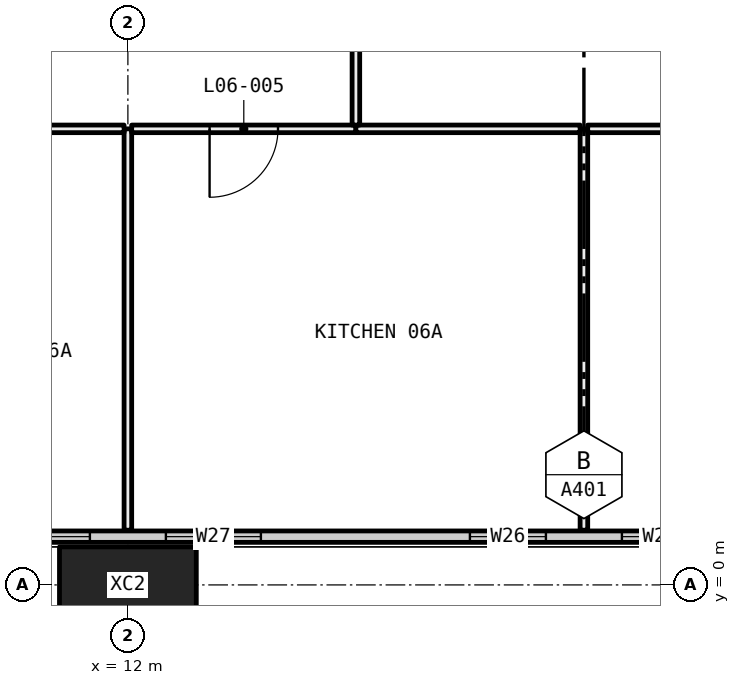
"""IFC4 building model, lengths in metres.
Left out: names, types, materials, properties, quantities, classifications, styles, units other than length and angle.
Written with IfcOpenShell. Run it as: python <this file> out.ifc"""

import sys

from ifc_helpers import new_model, si_unit, direction, frame, frame_2d, origin, origin_2d, place, context, subcontext, project, spatial, rectangle, hollow_rectangle, extrude, element, fill, save


model = new_model("IFC4")
c1 = context("Model", 3, precision=1e-05, world=origin(), true_north=direction((0.0, 1.0)))
c2 = subcontext(c1, "Body", "Model", "MODEL_VIEW")
j1 = project(units=[si_unit("LENGTHUNIT", "METRE"), si_unit("PLANEANGLEUNIT", "RADIAN")], contexts=[c1])
p1 = place(None, origin())
s1 = spatial("IfcSite", under=j1, at=p1, CompositionType="ELEMENT")
p2 = place(p1, origin())
s2 = spatial("IfcBuilding", under=s1, at=p2, CompositionType="ELEMENT")
p3 = place(p2, frame((0.0, 0.0, 33.45)))
s3 = spatial("IfcBuildingStorey", under=s2, at=p3, CompositionType="ELEMENT", Elevation=33.45)
p4 = place(p3, frame((12.0, 0.0, -0.4), z_axis=(0.0, 0.0, 1.0), x_axis=(1.0, 0.0, 0.0)))
e1 = element("IfcColumn", 1, at=p4, inside=s3, PredefinedType="COLUMN", context=c2, shape_type="SweptSolid", body=[
    extrude(hollow_rectangle(XDim=1.8, YDim=1.0, WallThickness=0.07, at=origin_2d()), origin(), (0.0, 0.0, 1.0), 3.45),
])
p5 = place(p3, frame((6.56, 0.635, 0.0), z_axis=(0.0, 0.0, 1.0), x_axis=(1.0, 0.0, 0.0)))
e2 = element("IfcWall", 2, at=p5, inside=s3, PredefinedType="ELEMENTEDWALL", context=c2, shape_type="SweptSolid", body=[
    extrude(rectangle(XDim=58.88, YDim=0.15, at=frame_2d((29.44, 0.0))), origin(), (0.0, 0.0, 1.0), 3.05),
])
p6 = place(p5, frame((0.44, 0.0, 0.45)))
e3 = element("IfcOpeningElement", 3, at=p6, cuts=e2, PredefinedType="OPENING", context=c2, shape_type="SweptSolid", body=[
    extrude(rectangle(XDim=4.5, YDim=2.55, at=frame_2d((2.25, 1.275))), frame((0.0, 0.085, 0.0), z_axis=(0.0, -1.0, 0.0), x_axis=(1.0, 0.0, 0.0)), (0.0, 0.0, 1.0), 0.17),
])
p7 = place(p5, frame((5.94, 0.0, 0.45)))
e4 = element("IfcOpeningElement", 4, at=p7, cuts=e2, PredefinedType="OPENING", context=c2, shape_type="SweptSolid", body=[
    extrude(rectangle(XDim=1.25, YDim=2.55, at=frame_2d((0.625, 1.275))), frame((0.0, 0.085, 0.0), z_axis=(0.0, -1.0, 0.0), x_axis=(1.0, 0.0, 0.0)), (0.0, 0.0, 1.0), 0.17),
])
p8 = place(p5, frame((9.94, 0.0, 0.45)))
e5 = element("IfcOpeningElement", 5, at=p8, cuts=e2, PredefinedType="OPENING", context=c2, shape_type="SweptSolid", body=[
    extrude(rectangle(XDim=1.0, YDim=2.55, at=frame_2d((0.5, 1.275))), frame((0.0, 0.085, 0.0), z_axis=(0.0, -1.0, 0.0), x_axis=(1.0, 0.0, 0.0)), (0.0, 0.0, 1.0), 0.17),
])
p9 = place(p5, frame((11.94, 0.0, 0.45)))
e6 = element("IfcOpeningElement", 6, at=p9, cuts=e2, PredefinedType="OPENING", context=c2, shape_type="SweptSolid", body=[
    extrude(rectangle(XDim=1.0, YDim=2.55, at=frame_2d((0.5, 1.275))), frame((0.0, 0.085, 0.0), z_axis=(0.0, -1.0, 0.0), x_axis=(1.0, 0.0, 0.0)), (0.0, 0.0, 1.0), 0.17),
])
p10 = place(p5, frame((15.69, 0.0, 0.45)))
e7 = element("IfcOpeningElement", 7, at=p10, cuts=e2, PredefinedType="OPENING", context=c2, shape_type="SweptSolid", body=[
    extrude(rectangle(XDim=1.25, YDim=2.55, at=frame_2d((0.625, 1.275))), frame((0.0, 0.085, 0.0), z_axis=(0.0, -1.0, 0.0), x_axis=(1.0, 0.0, 0.0)), (0.0, 0.0, 1.0), 0.17),
])
p11 = place(p5, frame((17.94, 0.0, 0.45)))
e8 = element("IfcOpeningElement", 8, at=p11, cuts=e2, PredefinedType="OPENING", context=c2, shape_type="SweptSolid", body=[
    extrude(rectangle(XDim=1.25, YDim=2.55, at=frame_2d((0.625, 1.275))), frame((0.0, 0.085, 0.0), z_axis=(0.0, -1.0, 0.0), x_axis=(1.0, 0.0, 0.0)), (0.0, 0.0, 1.0), 0.17),
])
p12 = place(p5, frame((21.94, 0.0, 0.45)))
e9 = element("IfcOpeningElement", 9, at=p12, cuts=e2, PredefinedType="OPENING", context=c2, shape_type="SweptSolid", body=[
    extrude(rectangle(XDim=1.0, YDim=2.55, at=frame_2d((0.5, 1.275))), frame((0.0, 0.085, 0.0), z_axis=(0.0, -1.0, 0.0), x_axis=(1.0, 0.0, 0.0)), (0.0, 0.0, 1.0), 0.17),
])
p13 = place(p5, frame((23.94, 0.0, 0.45)))
e10 = element("IfcOpeningElement", 10, at=p13, cuts=e2, PredefinedType="OPENING", context=c2, shape_type="SweptSolid", body=[
    extrude(rectangle(XDim=1.0, YDim=2.55, at=frame_2d((0.5, 1.275))), frame((0.0, 0.085, 0.0), z_axis=(0.0, -1.0, 0.0), x_axis=(1.0, 0.0, 0.0)), (0.0, 0.0, 1.0), 0.17),
])
p14 = place(p5, frame((27.69, 0.0, 0.45)))
e11 = element("IfcOpeningElement", 11, at=p14, cuts=e2, PredefinedType="OPENING", context=c2, shape_type="SweptSolid", body=[
    extrude(rectangle(XDim=1.25, YDim=2.55, at=frame_2d((0.625, 1.275))), frame((0.0, 0.085, 0.0), z_axis=(0.0, -1.0, 0.0), x_axis=(1.0, 0.0, 0.0)), (0.0, 0.0, 1.0), 0.17),
])
p15 = place(p5, frame((29.94, 0.0, 0.45)))
e12 = element("IfcOpeningElement", 12, at=p15, cuts=e2, PredefinedType="OPENING", context=c2, shape_type="SweptSolid", body=[
    extrude(rectangle(XDim=1.25, YDim=2.55, at=frame_2d((0.625, 1.275))), frame((0.0, 0.085, 0.0), z_axis=(0.0, -1.0, 0.0), x_axis=(1.0, 0.0, 0.0)), (0.0, 0.0, 1.0), 0.17),
])
p16 = place(p5, frame((33.94, 0.0, 0.45)))
e13 = element("IfcOpeningElement", 13, at=p16, cuts=e2, PredefinedType="OPENING", context=c2, shape_type="SweptSolid", body=[
    extrude(rectangle(XDim=1.0, YDim=2.55, at=frame_2d((0.5, 1.275))), frame((0.0, 0.085, 0.0), z_axis=(0.0, -1.0, 0.0), x_axis=(1.0, 0.0, 0.0)), (0.0, 0.0, 1.0), 0.17),
])
p17 = place(p5, frame((35.94, 0.0, 0.45)))
e14 = element("IfcOpeningElement", 14, at=p17, cuts=e2, PredefinedType="OPENING", context=c2, shape_type="SweptSolid", body=[
    extrude(rectangle(XDim=1.0, YDim=2.55, at=frame_2d((0.5, 1.275))), frame((0.0, 0.085, 0.0), z_axis=(0.0, -1.0, 0.0), x_axis=(1.0, 0.0, 0.0)), (0.0, 0.0, 1.0), 0.17),
])
p18 = place(p5, frame((39.69, 0.0, 0.45)))
e15 = element("IfcOpeningElement", 15, at=p18, cuts=e2, PredefinedType="OPENING", context=c2, shape_type="SweptSolid", body=[
    extrude(rectangle(XDim=1.25, YDim=2.55, at=frame_2d((0.625, 1.275))), frame((0.0, 0.085, 0.0), z_axis=(0.0, -1.0, 0.0), x_axis=(1.0, 0.0, 0.0)), (0.0, 0.0, 1.0), 0.17),
])
p19 = place(p5, frame((41.94, 0.0, 0.45)))
e16 = element("IfcOpeningElement", 16, at=p19, cuts=e2, PredefinedType="OPENING", context=c2, shape_type="SweptSolid", body=[
    extrude(rectangle(XDim=1.25, YDim=2.55, at=frame_2d((0.625, 1.275))), frame((0.0, 0.085, 0.0), z_axis=(0.0, -1.0, 0.0), x_axis=(1.0, 0.0, 0.0)), (0.0, 0.0, 1.0), 0.17),
])
p20 = place(p5, frame((45.94, 0.0, 0.45)))
e17 = element("IfcOpeningElement", 17, at=p20, cuts=e2, PredefinedType="OPENING", context=c2, shape_type="SweptSolid", body=[
    extrude(rectangle(XDim=1.0, YDim=2.55, at=frame_2d((0.5, 1.275))), frame((0.0, 0.085, 0.0), z_axis=(0.0, -1.0, 0.0), x_axis=(1.0, 0.0, 0.0)), (0.0, 0.0, 1.0), 0.17),
])
p21 = place(p5, frame((47.94, 0.0, 0.45)))
e18 = element("IfcOpeningElement", 18, at=p21, cuts=e2, PredefinedType="OPENING", context=c2, shape_type="SweptSolid", body=[
    extrude(rectangle(XDim=1.0, YDim=2.55, at=frame_2d((0.5, 1.275))), frame((0.0, 0.085, 0.0), z_axis=(0.0, -1.0, 0.0), x_axis=(1.0, 0.0, 0.0)), (0.0, 0.0, 1.0), 0.17),
])
p22 = place(p5, frame((51.69, 0.0, 0.45)))
e19 = element("IfcOpeningElement", 19, at=p22, cuts=e2, PredefinedType="OPENING", context=c2, shape_type="SweptSolid", body=[
    extrude(rectangle(XDim=1.25, YDim=2.55, at=frame_2d((0.625, 1.275))), frame((0.0, 0.085, 0.0), z_axis=(0.0, -1.0, 0.0), x_axis=(1.0, 0.0, 0.0)), (0.0, 0.0, 1.0), 0.17),
])
p23 = place(p5, frame((53.94, 0.0, 0.45)))
e20 = element("IfcOpeningElement", 20, at=p23, cuts=e2, PredefinedType="OPENING", context=c2, shape_type="SweptSolid", body=[
    extrude(rectangle(XDim=4.5, YDim=2.55, at=frame_2d((2.25, 1.275))), frame((0.0, 0.085, 0.0), z_axis=(0.0, -1.0, 0.0), x_axis=(1.0, 0.0, 0.0)), (0.0, 0.0, 1.0), 0.17),
])
p24 = place(p3, frame((12.0, 0.72, 0.0), z_axis=(0.0, 0.0, 1.0), x_axis=(0.0, 1.0, 0.0)))
e21 = element("IfcWall", 21, at=p24, inside=s3, PredefinedType="PARTITIONING", context=c2, shape_type="SweptSolid", body=[
    extrude(rectangle(XDim=5.28, YDim=0.1, at=frame_2d((2.64, 0.0))), origin(), (0.0, 0.0, 1.0), 2.45),
])
p25 = place(p3, frame((11.95, 6.0, 0.0), z_axis=(0.0, 0.0, 1.0), x_axis=(-1.0, 0.0, 0.0)))
e22 = element("IfcWall", 22, at=p25, inside=s3, PredefinedType="PARTITIONING", context=c2, shape_type="SweptSolid", body=[
    extrude(rectangle(XDim=5.23, YDim=0.1, at=frame_2d((2.615, 0.0))), origin(), (0.0, 0.0, 1.0), 2.45),
])
p26 = place(p25, frame((2.165, 0.0, 0.0)))
e23 = element("IfcOpeningElement", 23, at=p26, cuts=e22, PredefinedType="OPENING", context=c2, shape_type="SweptSolid", body=[
    extrude(rectangle(XDim=0.9, YDim=2.1, at=frame_2d((0.45, 1.05))), frame((0.0, 0.06, 0.0), z_axis=(0.0, -1.0, 0.0), x_axis=(1.0, 0.0, 0.0)), (0.0, 0.0, 1.0), 0.12),
])
p27 = place(p3, frame((18.0, 0.72, 0.0), z_axis=(0.0, 0.0, 1.0), x_axis=(0.0, 1.0, 0.0)))
e24 = element("IfcWall", 24, at=p27, inside=s3, PredefinedType="PARTITIONING", context=c2, shape_type="SweptSolid", body=[
    extrude(rectangle(XDim=5.28, YDim=0.1, at=frame_2d((2.64, 0.0))), origin(), (0.0, 0.0, 1.0), 3.05),
])
p28 = place(p3, frame((15.0, 6.0, 0.0), z_axis=(0.0, 0.0, 1.0), x_axis=(-1.0, 0.0, 0.0)))
e25 = element("IfcWall", 25, at=p28, inside=s3, PredefinedType="PARTITIONING", context=c2, shape_type="SweptSolid", body=[
    extrude(rectangle(XDim=2.95, YDim=0.1, at=frame_2d((1.475, 0.0))), origin(), (0.0, 0.0, 1.0), 2.45),
])
p29 = place(p28, frame((1.025, 0.0, 0.0)))
e26 = element("IfcOpeningElement", 26, at=p29, cuts=e25, PredefinedType="OPENING", context=c2, shape_type="SweptSolid", body=[
    extrude(rectangle(XDim=0.9, YDim=2.1, at=frame_2d((0.45, 1.05))), frame((0.0, 0.06, 0.0), z_axis=(0.0, -1.0, 0.0), x_axis=(1.0, 0.0, 0.0)), (0.0, 0.0, 1.0), 0.12),
])
p30 = place(p3, frame((17.95, 6.0, 0.0), z_axis=(0.0, 0.0, 1.0), x_axis=(-1.0, 0.0, 0.0)))
e27 = element("IfcWall", 27, at=p30, inside=s3, PredefinedType="PARTITIONING", context=c2, shape_type="SweptSolid", body=[
    extrude(rectangle(XDim=2.95, YDim=0.1, at=frame_2d((1.475, 0.0))), origin(), (0.0, 0.0, 1.0), 3.05),
])
p31 = place(p3, frame((23.95, 6.0, 0.0), z_axis=(0.0, 0.0, 1.0), x_axis=(-1.0, 0.0, 0.0)))
e28 = element("IfcWall", 28, at=p31, inside=s3, PredefinedType="PARTITIONING", context=c2, shape_type="SweptSolid", body=[
    extrude(rectangle(XDim=5.9, YDim=0.1, at=frame_2d((2.95, 0.0))), origin(), (0.0, 0.0, 1.0), 2.45),
])
p32 = place(p31, frame((2.5, 0.0, 0.0)))
e29 = element("IfcOpeningElement", 29, at=p32, cuts=e28, PredefinedType="OPENING", context=c2, shape_type="SweptSolid", body=[
    extrude(rectangle(XDim=0.9, YDim=2.1, at=frame_2d((0.45, 1.05))), frame((0.0, 0.06, 0.0), z_axis=(0.0, -1.0, 0.0), x_axis=(1.0, 0.0, 0.0)), (0.0, 0.0, 1.0), 0.12),
])
p33 = place(p3, frame((15.0, 6.05, 0.0), z_axis=(0.0, 0.0, 1.0), x_axis=(0.0, 1.0, 0.0)))
e30 = element("IfcWall", 30, at=p33, inside=s3, PredefinedType="PARTITIONING", context=c2, shape_type="SweptSolid", body=[
    extrude(rectangle(XDim=5.95, YDim=0.1, at=frame_2d((2.975, 0.0))), origin(), (0.0, 0.0, 1.0), 2.45),
])
p34 = place(p6, origin())
e31 = element("IfcWindow", 31, at=p34, inside=s3, PartitioningType="SINGLE_PANEL", PredefinedType="WINDOW", context=c2, shape_type="SweptSolid", body=[
    extrude(rectangle(XDim=4.5, YDim=2.55, at=frame_2d((2.25, 1.275))), frame((0.0, 0.03, 0.0), z_axis=(0.0, -1.0, 0.0), x_axis=(1.0, 0.0, 0.0)), (0.0, 0.0, 1.0), 0.06),
])
fill(e3, e31)
p35 = place(p7, origin())
e32 = element("IfcWindow", 32, at=p35, inside=s3, PartitioningType="SINGLE_PANEL", PredefinedType="WINDOW", context=c2, shape_type="SweptSolid", body=[
    extrude(rectangle(XDim=1.25, YDim=2.55, at=frame_2d((0.625, 1.275))), frame((0.0, 0.03, 0.0), z_axis=(0.0, -1.0, 0.0), x_axis=(1.0, 0.0, 0.0)), (0.0, 0.0, 1.0), 0.06),
])
fill(e4, e32)
p36 = place(p8, origin())
e33 = element("IfcWindow", 33, at=p36, inside=s3, PartitioningType="SINGLE_PANEL", PredefinedType="WINDOW", context=c2, shape_type="SweptSolid", body=[
    extrude(rectangle(XDim=1.0, YDim=2.55, at=frame_2d((0.5, 1.275))), frame((0.0, 0.03, 0.0), z_axis=(0.0, -1.0, 0.0), x_axis=(1.0, 0.0, 0.0)), (0.0, 0.0, 1.0), 0.06),
])
fill(e5, e33)
p37 = place(p9, origin())
e34 = element("IfcWindow", 34, at=p37, inside=s3, PartitioningType="SINGLE_PANEL", PredefinedType="WINDOW", context=c2, shape_type="SweptSolid", body=[
    extrude(rectangle(XDim=1.0, YDim=2.55, at=frame_2d((0.5, 1.275))), frame((0.0, 0.03, 0.0), z_axis=(0.0, -1.0, 0.0), x_axis=(1.0, 0.0, 0.0)), (0.0, 0.0, 1.0), 0.06),
])
fill(e6, e34)
p38 = place(p29, origin())
e35 = element("IfcDoor", 35, at=p38, inside=s3, OperationType="SINGLE_SWING_LEFT", PredefinedType="DOOR", context=c2, shape_type="SweptSolid", body=[
    extrude(rectangle(XDim=0.9, YDim=2.1, at=frame_2d((0.45, 1.05))), frame((0.0, 0.025, 0.0), z_axis=(0.0, -1.0, 0.0), x_axis=(1.0, 0.0, 0.0)), (0.0, 0.0, 1.0), 0.05),
])
fill(e26, e35)
save(model, sys.argv[1])
